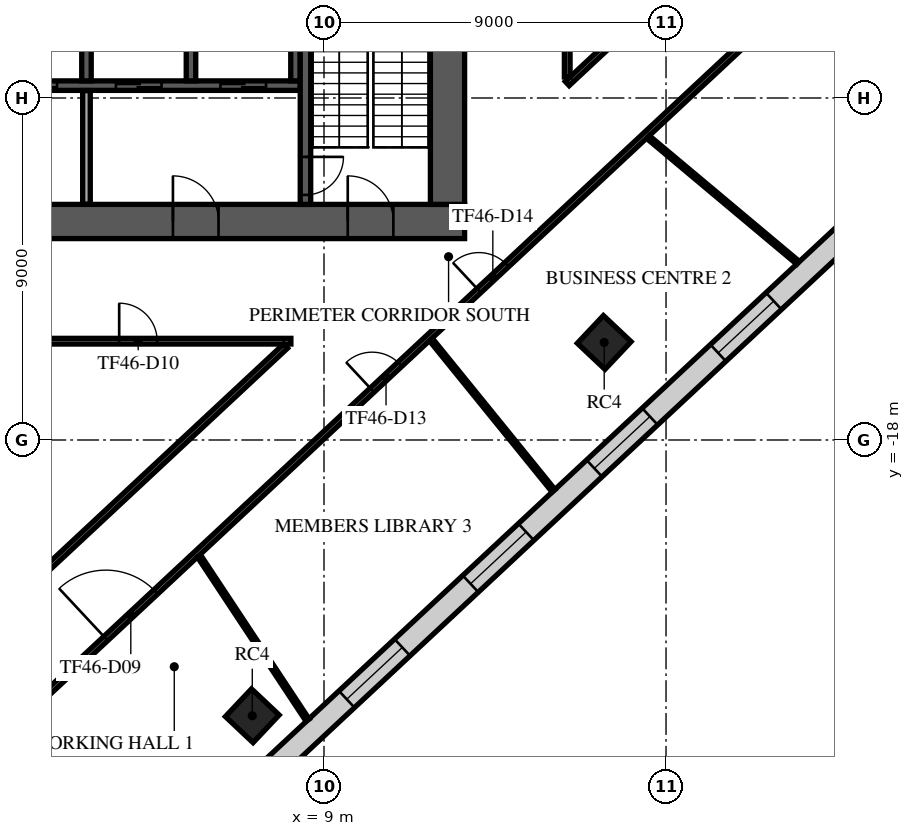
"""IFC4 building model, lengths in metres.
Left out: names, types, materials, properties, quantities, classifications, styles, units other than length and angle.
Written with IfcOpenShell. Run it as: python <this file> out.ifc"""

import sys

from ifc_helpers import new_model, si_unit, direction, frame, frame_2d, origin, origin_2d, place, context, subcontext, project, spatial, rectangle, extrude, element, fill, save


model = new_model("IFC4")
c1 = context("Model", 3, precision=1e-05, world=origin(), true_north=direction((0.0, 1.0)))
c2 = subcontext(c1, "Body", "Model", "MODEL_VIEW")
j1 = project(units=[si_unit("LENGTHUNIT", "METRE"), si_unit("PLANEANGLEUNIT", "RADIAN")], contexts=[c1])
p1 = place(None, origin())
s1 = spatial("IfcSite", under=j1, at=p1, CompositionType="ELEMENT")
p2 = place(p1, origin())
s2 = spatial("IfcBuilding", under=s1, at=p2, CompositionType="ELEMENT")
p3 = place(p2, frame((0.0, 0.0, 197.3)))
s3 = spatial("IfcBuildingStorey", under=s2, at=p3, CompositionType="ELEMENT", Elevation=197.3)
for number, where, z_axis, x_axis in (
    (1, (7.113, -25.257, 0.0), (0.0, 0.0, 1.0), (0.686, 0.728, 0.0)),
    (2, (16.373, -15.433, 0.0), (0.0, 0.0, 1.0), (0.686, 0.728, 0.0)),
):
    element("IfcColumn", number, at=place(p3, frame(where, z_axis=z_axis, x_axis=x_axis)), inside=s3, PredefinedType="COLUMN", context=c2, shape_type="SweptSolid", body=[
        extrude(rectangle(XDim=1.0, YDim=1.0, at=origin_2d()), origin(), (0.0, 0.0, 1.0), 4.0),
    ])
p4 = place(p3, frame((-12.7, -12.25, 0.0), z_axis=(0.0, 0.0, 1.0), x_axis=(1.0, 0.0, 0.0)))
e3 = element("IfcWall", 3, at=p4, inside=s3, PredefinedType="SHEAR", context=c2, shape_type="SweptSolid", body=[
    extrude(rectangle(XDim=25.4, YDim=0.9, at=frame_2d((12.7, 0.0))), origin(), (0.0, 0.0, 1.0), 3.62),
])
p5 = place(p4, frame((7.6, 0.0, 0.0)))
e4 = element("IfcOpeningElement", 4, at=p5, cuts=e3, PredefinedType="OPENING", context=c2, shape_type="SweptSolid", body=[
    extrude(rectangle(XDim=2.0, YDim=2.1, at=frame_2d((1.0, 1.05))), frame((0.0, 0.46, 0.0), z_axis=(0.0, -1.0, 0.0), x_axis=(1.0, 0.0, 0.0)), (0.0, 0.0, 1.0), 0.92),
])
p6 = place(p4, frame((17.725, 0.0, 0.0)))
e5 = element("IfcOpeningElement", 5, at=p6, cuts=e3, PredefinedType="OPENING", context=c2, shape_type="SweptSolid", body=[
    extrude(rectangle(XDim=1.2, YDim=2.1, at=frame_2d((0.6, 1.05))), frame((0.0, 0.46, 0.0), z_axis=(0.0, -1.0, 0.0), x_axis=(1.0, 0.0, 0.0)), (0.0, 0.0, 1.0), 0.92),
])
p7 = place(p4, frame((1.875, 0.0, 0.0)))
e6 = element("IfcOpeningElement", 6, at=p7, cuts=e3, PredefinedType="OPENING", context=c2, shape_type="SweptSolid", body=[
    extrude(rectangle(XDim=1.2, YDim=2.1, at=frame_2d((0.6, 1.05))), frame((0.0, 0.46, 0.0), z_axis=(0.0, -1.0, 0.0), x_axis=(1.0, 0.0, 0.0)), (0.0, 0.0, 1.0), 0.92),
])
p8 = place(p4, frame((22.325, 0.0, 0.0)))
e7 = element("IfcOpeningElement", 7, at=p8, cuts=e3, PredefinedType="OPENING", context=c2, shape_type="SweptSolid", body=[
    extrude(rectangle(XDim=1.2, YDim=2.1, at=frame_2d((0.6, 1.05))), frame((0.0, 0.46, 0.0), z_axis=(0.0, -1.0, 0.0), x_axis=(1.0, 0.0, 0.0)), (0.0, 0.0, 1.0), 0.92),
])
p9 = place(p3, frame((12.25, -11.8, 0.0), z_axis=(0.0, 0.0, 1.0), x_axis=(0.0, 1.0, 0.0)))
e8 = element("IfcWall", 8, at=p9, inside=s3, PredefinedType="SHEAR", context=c2, shape_type="SweptSolid", body=[
    extrude(rectangle(XDim=23.6, YDim=0.9, at=frame_2d((11.8, 0.0))), origin(), (0.0, 0.0, 1.0), 3.62),
])
p10 = place(p9, frame((10.6, 0.0, 0.0)))
e9 = element("IfcOpeningElement", 9, at=p10, cuts=e8, PredefinedType="OPENING", context=c2, shape_type="SweptSolid", body=[
    extrude(rectangle(XDim=2.4, YDim=2.4, at=frame_2d((1.2, 1.2))), frame((0.0, 0.46, 0.0), z_axis=(0.0, -1.0, 0.0), x_axis=(1.0, 0.0, 0.0)), (0.0, 0.0, 1.0), 0.92),
])
p11 = place(p3, frame((-2.875, -8.675, 0.0), z_axis=(0.0, 0.0, 1.0), x_axis=(1.0, 0.0, 0.0)))
e10 = element("IfcWall", 10, at=p11, inside=s3, PredefinedType="SOLIDWALL", context=c2, shape_type="SweptSolid", body=[
    extrude(rectangle(XDim=11.25, YDim=0.25, at=frame_2d((5.625, 0.0))), origin(), (0.0, 0.0, 1.0), 3.62),
])
p12 = place(p11, frame((0.9, 0.0, 0.0)))
e11 = element("IfcOpeningElement", 11, at=p12, cuts=e10, PredefinedType="OPENING", context=c2, shape_type="SweptSolid", body=[
    extrude(rectangle(XDim=1.2, YDim=2.1, at=frame_2d((0.6, 1.05))), frame((0.0, 0.135, 0.0), z_axis=(0.0, -1.0, 0.0), x_axis=(1.0, 0.0, 0.0)), (0.0, 0.0, 1.0), 0.27),
])
p13 = place(p11, frame((3.65, 0.0, 0.0)))
e12 = element("IfcOpeningElement", 12, at=p13, cuts=e10, PredefinedType="OPENING", context=c2, shape_type="SweptSolid", body=[
    extrude(rectangle(XDim=1.2, YDim=2.1, at=frame_2d((0.6, 1.05))), frame((0.0, 0.135, 0.0), z_axis=(0.0, -1.0, 0.0), x_axis=(1.0, 0.0, 0.0)), (0.0, 0.0, 1.0), 0.27),
])
p14 = place(p11, frame((6.4, 0.0, 0.0)))
e13 = element("IfcOpeningElement", 13, at=p14, cuts=e10, PredefinedType="OPENING", context=c2, shape_type="SweptSolid", body=[
    extrude(rectangle(XDim=1.2, YDim=2.1, at=frame_2d((0.6, 1.05))), frame((0.0, 0.135, 0.0), z_axis=(0.0, -1.0, 0.0), x_axis=(1.0, 0.0, 0.0)), (0.0, 0.0, 1.0), 0.27),
])
p15 = place(p11, frame((9.15, 0.0, 0.0)))
e14 = element("IfcOpeningElement", 14, at=p15, cuts=e10, PredefinedType="OPENING", context=c2, shape_type="SweptSolid", body=[
    extrude(rectangle(XDim=1.2, YDim=2.1, at=frame_2d((0.6, 1.05))), frame((0.0, 0.135, 0.0), z_axis=(0.0, -1.0, 0.0), x_axis=(1.0, 0.0, 0.0)), (0.0, 0.0, 1.0), 0.27),
])
for number, where, z_axis, x_axis in (
    (15, (2.75, -8.55, 0.0), (0.0, 0.0, 1.0), (0.0, 1.0, 0.0)),
    (16, (5.5, -8.55, 0.0), (0.0, 0.0, 1.0), (0.0, 1.0, 0.0)),
    (17, (8.25, -8.55, 0.0), (0.0, 0.0, 1.0), (0.0, 1.0, 0.0)),
):
    element("IfcWall", number, at=place(p3, frame(where, z_axis=z_axis, x_axis=x_axis)), inside=s3, PredefinedType="SOLIDWALL", context=c2, shape_type="SweptSolid", body=[
        extrude(rectangle(XDim=2.7, YDim=0.25, at=frame_2d((1.35, 0.0))), origin(), (0.0, 0.0, 1.0), 3.62),
    ])
p16 = place(p3, frame((8.512, -4.55, 0.0), z_axis=(0.0, 0.0, 1.0), x_axis=(0.0, -1.0, 0.0)))
e18 = element("IfcWall", 18, at=p16, inside=s3, PredefinedType="SOLIDWALL", context=c2, shape_type="SweptSolid", body=[
    extrude(rectangle(XDim=7.25, YDim=0.275, at=frame_2d((3.625, 0.0))), origin(), (0.0, 0.0, 1.0), 3.62),
])
p17 = place(p16, frame((6.0, 0.0, 0.0)))
e19 = element("IfcOpeningElement", 19, at=p17, cuts=e18, PredefinedType="OPENING", context=c2, shape_type="SweptSolid", body=[
    extrude(rectangle(XDim=1.0, YDim=2.1, at=frame_2d((0.5, 1.05))), frame((0.0, 0.147, 0.0), z_axis=(0.0, -1.0, 0.0), x_axis=(1.0, 0.0, 0.0)), (0.0, 0.0, 1.0), 0.295),
])
p18 = place(p3, frame((2.75, -11.795, 0.0), z_axis=(0.0, 0.0, 1.0), x_axis=(0.0, 1.0, 0.0)))
e20 = element("IfcWall", 20, at=p18, inside=s3, PredefinedType="PARTITIONING", context=c2, shape_type="SweptSolid", body=[
    extrude(rectangle(XDim=2.99, YDim=0.2, at=frame_2d((1.495, 0.0))), origin(), (0.0, 0.0, 1.0), 3.62),
])
p19 = place(p3, frame((-1.073, -34.773, 0.0), z_axis=(0.0, 0.0, 1.0), x_axis=(0.731351780381, 0.682000420333, 0.0)))
e21 = element("IfcWall", 21, at=p19, inside=s3, PredefinedType="STANDARD", context=c2, shape_type="SweptSolid", body=[
    extrude(rectangle(XDim=49.0, YDim=0.6, at=frame_2d((24.5, 0.0))), origin(), (0.0, 0.0, 1.0), 3.62),
])
p20 = place(p19, frame((1.227, 0.0, 0.9)))
e22 = element("IfcOpeningElement", 22, at=p20, cuts=e21, PredefinedType="OPENING", context=c2, shape_type="SweptSolid", body=[
    extrude(rectangle(XDim=2.0, YDim=2.1, at=frame_2d((1.0, 1.05))), frame((0.0, 0.31, 0.0), z_axis=(0.0, -1.0, 0.0), x_axis=(1.0, 0.0, 0.0)), (0.0, 0.0, 1.0), 0.62),
])
p21 = place(p19, frame((5.682, 0.0, 0.9)))
e23 = element("IfcOpeningElement", 23, at=p21, cuts=e21, PredefinedType="OPENING", context=c2, shape_type="SweptSolid", body=[
    extrude(rectangle(XDim=2.0, YDim=2.1, at=frame_2d((1.0, 1.05))), frame((0.0, 0.31, 0.0), z_axis=(0.0, -1.0, 0.0), x_axis=(1.0, 0.0, 0.0)), (0.0, 0.0, 1.0), 0.62),
])
p22 = place(p19, frame((14.591, 0.0, 0.9)))
e24 = element("IfcOpeningElement", 24, at=p22, cuts=e21, PredefinedType="OPENING", context=c2, shape_type="SweptSolid", body=[
    extrude(rectangle(XDim=2.0, YDim=2.1, at=frame_2d((1.0, 1.05))), frame((0.0, 0.31, 0.0), z_axis=(0.0, -1.0, 0.0), x_axis=(1.0, 0.0, 0.0)), (0.0, 0.0, 1.0), 0.62),
])
p23 = place(p19, frame((19.045, 0.0, 0.9)))
e25 = element("IfcOpeningElement", 25, at=p23, cuts=e21, PredefinedType="OPENING", context=c2, shape_type="SweptSolid", body=[
    extrude(rectangle(XDim=2.0, YDim=2.1, at=frame_2d((1.0, 1.05))), frame((0.0, 0.31, 0.0), z_axis=(0.0, -1.0, 0.0), x_axis=(1.0, 0.0, 0.0)), (0.0, 0.0, 1.0), 0.62),
])
p24 = place(p19, frame((23.5, 0.0, 0.9)))
e26 = element("IfcOpeningElement", 26, at=p24, cuts=e21, PredefinedType="OPENING", context=c2, shape_type="SweptSolid", body=[
    extrude(rectangle(XDim=2.0, YDim=2.1, at=frame_2d((1.0, 1.05))), frame((0.0, 0.31, 0.0), z_axis=(0.0, -1.0, 0.0), x_axis=(1.0, 0.0, 0.0)), (0.0, 0.0, 1.0), 0.62),
])
p25 = place(p19, frame((27.955, 0.0, 0.9)))
e27 = element("IfcOpeningElement", 27, at=p25, cuts=e21, PredefinedType="OPENING", context=c2, shape_type="SweptSolid", body=[
    extrude(rectangle(XDim=2.0, YDim=2.1, at=frame_2d((1.0, 1.05))), frame((0.0, 0.31, 0.0), z_axis=(0.0, -1.0, 0.0), x_axis=(1.0, 0.0, 0.0)), (0.0, 0.0, 1.0), 0.62),
])
p26 = place(p19, frame((32.409, 0.0, 0.9)))
e28 = element("IfcOpeningElement", 28, at=p26, cuts=e21, PredefinedType="OPENING", context=c2, shape_type="SweptSolid", body=[
    extrude(rectangle(XDim=2.0, YDim=2.1, at=frame_2d((1.0, 1.05))), frame((0.0, 0.31, 0.0), z_axis=(0.0, -1.0, 0.0), x_axis=(1.0, 0.0, 0.0)), (0.0, 0.0, 1.0), 0.62),
])
p27 = place(p19, frame((36.864, 0.0, 0.9)))
e29 = element("IfcOpeningElement", 29, at=p27, cuts=e21, PredefinedType="OPENING", context=c2, shape_type="SweptSolid", body=[
    extrude(rectangle(XDim=2.0, YDim=2.1, at=frame_2d((1.0, 1.05))), frame((0.0, 0.31, 0.0), z_axis=(0.0, -1.0, 0.0), x_axis=(1.0, 0.0, 0.0)), (0.0, 0.0, 1.0), 0.62),
])
p28 = place(p19, frame((41.318, 0.0, 0.9)))
e30 = element("IfcOpeningElement", 30, at=p28, cuts=e21, PredefinedType="OPENING", context=c2, shape_type="SweptSolid", body=[
    extrude(rectangle(XDim=2.0, YDim=2.1, at=frame_2d((1.0, 1.05))), frame((0.0, 0.31, 0.0), z_axis=(0.0, -1.0, 0.0), x_axis=(1.0, 0.0, 0.0)), (0.0, 0.0, 1.0), 0.62),
])
p29 = place(p19, frame((45.773, 0.0, 0.9)))
e31 = element("IfcOpeningElement", 31, at=p29, cuts=e21, PredefinedType="OPENING", context=c2, shape_type="SweptSolid", body=[
    extrude(rectangle(XDim=2.0, YDim=2.1, at=frame_2d((1.0, 1.05))), frame((0.0, 0.31, 0.0), z_axis=(0.0, -1.0, 0.0), x_axis=(1.0, 0.0, 0.0)), (0.0, 0.0, 1.0), 0.62),
])
p30 = place(p3, frame((-12.208, -15.4, 0.0), z_axis=(0.0, 0.0, 1.0), x_axis=(1.0, 0.0, 0.0)))
e32 = element("IfcWall", 32, at=p30, inside=s3, PredefinedType="PARTITIONING", context=c2, shape_type="SweptSolid", body=[
    extrude(rectangle(XDim=20.336, YDim=0.15, at=frame_2d((10.168, 0.0))), origin(), (0.0, 0.0, 1.0), 3.17),
])
p31 = place(p30, frame((1.05, 0.0, 0.0)))
e33 = element("IfcOpeningElement", 33, at=p31, cuts=e32, PredefinedType="OPENING", context=c2, shape_type="SweptSolid", body=[
    extrude(rectangle(XDim=1.0, YDim=2.1, at=frame_2d((0.5, 1.05))), frame((0.0, 0.085, 0.0), z_axis=(0.0, -1.0, 0.0), x_axis=(1.0, 0.0, 0.0)), (0.0, 0.0, 1.0), 0.17),
])
p32 = place(p30, frame((15.818, 0.0, 0.0)))
e34 = element("IfcOpeningElement", 34, at=p32, cuts=e32, PredefinedType="OPENING", context=c2, shape_type="SweptSolid", body=[
    extrude(rectangle(XDim=1.0, YDim=2.1, at=frame_2d((0.5, 1.05))), frame((0.0, 0.085, 0.0), z_axis=(0.0, -1.0, 0.0), x_axis=(1.0, 0.0, 0.0)), (0.0, 0.0, 1.0), 0.17),
])
p33 = place(p3, frame((-0.061, -23.038, 0.0), z_axis=(0.0, 0.0, 1.0), x_axis=(0.731316284431, 0.682038482878, 0.0)))
e35 = element("IfcWall", 35, at=p33, inside=s3, PredefinedType="PARTITIONING", context=c2, shape_type="SweptSolid", body=[
    extrude(rectangle(XDim=11.009, YDim=0.15, at=frame_2d((5.504, 0.0))), origin(), (0.0, 0.0, 1.0), 3.17),
])
p34 = place(p3, frame((1.576, -24.793, 0.0), z_axis=(0.0, 0.0, 1.0), x_axis=(0.731351215564, 0.68200102602, 0.0)))
e36 = element("IfcWall", 36, at=p34, inside=s3, PredefinedType="PARTITIONING", context=c2, shape_type="SweptSolid", body=[
    extrude(rectangle(XDim=31.513, YDim=0.15, at=frame_2d((15.757, 0.0))), origin(), (0.0, 0.0, 1.0), 3.17),
])
p35 = place(p34, frame((2.3, 0.0, 0.0)))
e37 = element("IfcOpeningElement", 37, at=p35, cuts=e36, PredefinedType="OPENING", context=c2, shape_type="SweptSolid", body=[
    extrude(rectangle(XDim=1.8, YDim=2.1, at=frame_2d((0.9, 1.05))), frame((0.0, 0.085, 0.0), z_axis=(0.0, -1.0, 0.0), x_axis=(1.0, 0.0, 0.0)), (0.0, 0.0, 1.0), 0.17),
])
p36 = place(p34, frame((11.883, 0.0, 0.0)))
e38 = element("IfcOpeningElement", 38, at=p36, cuts=e36, PredefinedType="OPENING", context=c2, shape_type="SweptSolid", body=[
    extrude(rectangle(XDim=1.0, YDim=2.1, at=frame_2d((0.5, 1.05))), frame((0.0, 0.085, 0.0), z_axis=(0.0, -1.0, 0.0), x_axis=(1.0, 0.0, 0.0)), (0.0, 0.0, 1.0), 0.17),
])
p37 = place(p34, frame((15.726, 0.0, 0.0)))
e39 = element("IfcOpeningElement", 39, at=p37, cuts=e36, PredefinedType="OPENING", context=c2, shape_type="SweptSolid", body=[
    extrude(rectangle(XDim=1.0, YDim=2.1, at=frame_2d((0.5, 1.05))), frame((0.0, 0.085, 0.0), z_axis=(0.0, -1.0, 0.0), x_axis=(1.0, 0.0, 0.0)), (0.0, 0.0, 1.0), 0.17),
])
p38 = place(p3, frame((15.4, -8.62, 0.0), z_axis=(0.0, 0.0, 1.0), x_axis=(0.731354186133, 0.681997840485, 0.0)))
e40 = element("IfcWall", 40, at=p38, inside=s3, PredefinedType="PARTITIONING", context=c2, shape_type="SweptSolid", body=[
    extrude(rectangle(XDim=10.373, YDim=0.15, at=frame_2d((5.187, 0.0))), origin(), (0.0, 0.0, 1.0), 3.17),
])
p39 = place(p3, frame((15.4, -8.448, 0.0), z_axis=(0.0, 0.0, 1.0), x_axis=(0.0, 1.0, 0.0)))
e41 = element("IfcWall", 41, at=p39, inside=s3, PredefinedType="PARTITIONING", context=c2, shape_type="SweptSolid", body=[
    extrude(rectangle(XDim=20.608, YDim=0.15, at=frame_2d((10.304, 0.0))), origin(), (0.0, 0.0, 1.0), 3.17),
])
p40 = place(p39, frame((3.3, 0.0, 0.0)))
e42 = element("IfcOpeningElement", 42, at=p40, cuts=e41, PredefinedType="OPENING", context=c2, shape_type="SweptSolid", body=[
    extrude(rectangle(XDim=1.0, YDim=2.1, at=frame_2d((0.5, 1.05))), frame((0.0, 0.085, 0.0), z_axis=(0.0, -1.0, 0.0), x_axis=(1.0, 0.0, 0.0)), (0.0, 0.0, 1.0), 0.17),
])
p41 = place(p39, frame((11.298, 0.0, 0.0)))
e43 = element("IfcOpeningElement", 43, at=p41, cuts=e41, PredefinedType="OPENING", context=c2, shape_type="SweptSolid", body=[
    extrude(rectangle(XDim=1.8, YDim=2.1, at=frame_2d((0.9, 1.05))), frame((0.0, 0.085, 0.0), z_axis=(0.0, -1.0, 0.0), x_axis=(1.0, 0.0, 0.0)), (0.0, 0.0, 1.0), 0.17),
])
p42 = place(p3, frame((5.711, -21.052, 0.0), z_axis=(0.0, 0.0, 1.0), x_axis=(0.55163930412, -0.834082776557, 0.0)))
e44 = element("IfcWall", 44, at=p42, inside=s3, PredefinedType="PARTITIONING", context=c2, shape_type="SweptSolid", body=[
    extrude(rectangle(XDim=5.178, YDim=0.1, at=frame_2d((2.589, 0.0))), origin(), (0.0, 0.0, 1.0), 2.97),
])
p43 = place(p3, frame((11.812, -15.355, 0.0), z_axis=(0.0, 0.0, 1.0), x_axis=(0.629927020313, -0.776654330497, 0.0)))
e45 = element("IfcWall", 45, at=p43, inside=s3, PredefinedType="PARTITIONING", context=c2, shape_type="SweptSolid", body=[
    extrude(rectangle(XDim=5.125, YDim=0.1, at=frame_2d((2.562, 0.0))), origin(), (0.0, 0.0, 1.0), 2.97),
])
p44 = place(p3, frame((17.527, -10.03, 0.0), z_axis=(0.0, 0.0, 1.0), x_axis=(0.76649272058, -0.642252994775, 0.0)))
e46 = element("IfcWall", 46, at=p44, inside=s3, PredefinedType="PARTITIONING", context=c2, shape_type="SweptSolid", body=[
    extrude(rectangle(XDim=5.148, YDim=0.1, at=frame_2d((2.574, 0.0))), origin(), (0.0, 0.0, 1.0), 2.97),
])
p45 = place(p6, origin())
e47 = element("IfcDoor", 47, at=p45, inside=s3, OperationType="SINGLE_SWING_LEFT", PredefinedType="DOOR", context=c2, shape_type="SweptSolid", body=[
    extrude(rectangle(XDim=1.2, YDim=2.1, at=frame_2d((0.6, 1.05))), frame((0.0, 0.025, 0.0), z_axis=(0.0, -1.0, 0.0), x_axis=(1.0, 0.0, 0.0)), (0.0, 0.0, 1.0), 0.05),
])
fill(e5, e47)
p46 = place(p8, origin())
e48 = element("IfcDoor", 48, at=p46, inside=s3, OperationType="SINGLE_SWING_LEFT", PredefinedType="DOOR", context=c2, shape_type="SweptSolid", body=[
    extrude(rectangle(XDim=1.2, YDim=2.1, at=frame_2d((0.6, 1.05))), frame((0.0, 0.025, 0.0), z_axis=(0.0, -1.0, 0.0), x_axis=(1.0, 0.0, 0.0)), (0.0, 0.0, 1.0), 0.05),
])
fill(e7, e48)
p47 = place(p13, origin())
e49 = element("IfcDoor", 49, at=p47, inside=s3, OperationType="DOUBLE_DOOR_SLIDING", PredefinedType="DOOR", context=c2, shape_type="SweptSolid", body=[
    extrude(rectangle(XDim=1.2, YDim=2.1, at=frame_2d((0.6, 1.05))), frame((0.0, 0.025, 0.0), z_axis=(0.0, -1.0, 0.0), x_axis=(1.0, 0.0, 0.0)), (0.0, 0.0, 1.0), 0.05),
])
fill(e12, e49)
p48 = place(p14, origin())
e50 = element("IfcDoor", 50, at=p48, inside=s3, OperationType="DOUBLE_DOOR_SLIDING", PredefinedType="DOOR", context=c2, shape_type="SweptSolid", body=[
    extrude(rectangle(XDim=1.2, YDim=2.1, at=frame_2d((0.6, 1.05))), frame((0.0, 0.025, 0.0), z_axis=(0.0, -1.0, 0.0), x_axis=(1.0, 0.0, 0.0)), (0.0, 0.0, 1.0), 0.05),
])
fill(e13, e50)
p49 = place(p15, origin())
e51 = element("IfcDoor", 51, at=p49, inside=s3, OperationType="DOUBLE_DOOR_SLIDING", PredefinedType="DOOR", context=c2, shape_type="SweptSolid", body=[
    extrude(rectangle(XDim=1.2, YDim=2.1, at=frame_2d((0.6, 1.05))), frame((0.0, 0.025, 0.0), z_axis=(0.0, -1.0, 0.0), x_axis=(1.0, 0.0, 0.0)), (0.0, 0.0, 1.0), 0.05),
])
fill(e14, e51)
p50 = place(p17, origin())
e52 = element("IfcDoor", 52, at=p50, inside=s3, OperationType="SINGLE_SWING_LEFT", PredefinedType="DOOR", context=c2, shape_type="SweptSolid", body=[
    extrude(rectangle(XDim=1.0, YDim=2.1, at=frame_2d((0.5, 1.05))), frame((0.0, 0.025, 0.0), z_axis=(0.0, -1.0, 0.0), x_axis=(1.0, 0.0, 0.0)), (0.0, 0.0, 1.0), 0.05),
])
fill(e19, e52)
p51 = place(p22, origin())
e53 = element("IfcWindow", 53, at=p51, inside=s3, PartitioningType="SINGLE_PANEL", PredefinedType="WINDOW", context=c2, shape_type="SweptSolid", body=[
    extrude(rectangle(XDim=2.0, YDim=2.1, at=frame_2d((1.0, 1.05))), frame((0.0, 0.03, 0.0), z_axis=(0.0, -1.0, 0.0), x_axis=(1.0, 0.0, 0.0)), (0.0, 0.0, 1.0), 0.06),
])
fill(e24, e53)
p52 = place(p23, origin())
e54 = element("IfcWindow", 54, at=p52, inside=s3, PartitioningType="SINGLE_PANEL", PredefinedType="WINDOW", context=c2, shape_type="SweptSolid", body=[
    extrude(rectangle(XDim=2.0, YDim=2.1, at=frame_2d((1.0, 1.05))), frame((0.0, 0.03, 0.0), z_axis=(0.0, -1.0, 0.0), x_axis=(1.0, 0.0, 0.0)), (0.0, 0.0, 1.0), 0.06),
])
fill(e25, e54)
p53 = place(p24, origin())
e55 = element("IfcWindow", 55, at=p53, inside=s3, PartitioningType="SINGLE_PANEL", PredefinedType="WINDOW", context=c2, shape_type="SweptSolid", body=[
    extrude(rectangle(XDim=2.0, YDim=2.1, at=frame_2d((1.0, 1.05))), frame((0.0, 0.03, 0.0), z_axis=(0.0, -1.0, 0.0), x_axis=(1.0, 0.0, 0.0)), (0.0, 0.0, 1.0), 0.06),
])
fill(e26, e55)
p54 = place(p25, origin())
e56 = element("IfcWindow", 56, at=p54, inside=s3, PartitioningType="SINGLE_PANEL", PredefinedType="WINDOW", context=c2, shape_type="SweptSolid", body=[
    extrude(rectangle(XDim=2.0, YDim=2.1, at=frame_2d((1.0, 1.05))), frame((0.0, 0.03, 0.0), z_axis=(0.0, -1.0, 0.0), x_axis=(1.0, 0.0, 0.0)), (0.0, 0.0, 1.0), 0.06),
])
fill(e27, e56)
p55 = place(p35, frame((1.8, 0.0, 0.0), z_axis=(0.0, 0.0, 1.0), x_axis=(-1.0, 0.0, 0.0)))
e57 = element("IfcDoor", 57, at=p55, inside=s3, OperationType="DOUBLE_DOOR_SINGLE_SWING", PredefinedType="DOOR", context=c2, shape_type="SweptSolid", body=[
    extrude(rectangle(XDim=1.8, YDim=2.1, at=frame_2d((0.9, 1.05))), frame((0.0, 0.025, 0.0), z_axis=(0.0, -1.0, 0.0), x_axis=(1.0, 0.0, 0.0)), (0.0, 0.0, 1.0), 0.05),
])
fill(e37, e57)
p56 = place(p32, frame((1.0, 0.0, 0.0), z_axis=(0.0, 0.0, 1.0), x_axis=(-1.0, 0.0, 0.0)))
e58 = element("IfcDoor", 58, at=p56, inside=s3, OperationType="SINGLE_SWING_LEFT", PredefinedType="DOOR", context=c2, shape_type="SweptSolid", body=[
    extrude(rectangle(XDim=1.0, YDim=2.1, at=frame_2d((0.5, 1.05))), frame((0.0, 0.025, 0.0), z_axis=(0.0, -1.0, 0.0), x_axis=(1.0, 0.0, 0.0)), (0.0, 0.0, 1.0), 0.05),
])
fill(e34, e58)
p57 = place(p36, frame((1.0, 0.0, 0.0), z_axis=(0.0, 0.0, 1.0), x_axis=(-1.0, 0.0, 0.0)))
e59 = element("IfcDoor", 59, at=p57, inside=s3, OperationType="SINGLE_SWING_LEFT", PredefinedType="DOOR", context=c2, shape_type="SweptSolid", body=[
    extrude(rectangle(XDim=1.0, YDim=2.1, at=frame_2d((0.5, 1.05))), frame((0.0, 0.025, 0.0), z_axis=(0.0, -1.0, 0.0), x_axis=(1.0, 0.0, 0.0)), (0.0, 0.0, 1.0), 0.05),
])
fill(e38, e59)
p58 = place(p37, frame((1.0, 0.0, 0.0), z_axis=(0.0, 0.0, 1.0), x_axis=(-1.0, 0.0, 0.0)))
e60 = element("IfcDoor", 60, at=p58, inside=s3, OperationType="SINGLE_SWING_LEFT", PredefinedType="DOOR", context=c2, shape_type="SweptSolid", body=[
    extrude(rectangle(XDim=1.0, YDim=2.1, at=frame_2d((0.5, 1.05))), frame((0.0, 0.025, 0.0), z_axis=(0.0, -1.0, 0.0), x_axis=(1.0, 0.0, 0.0)), (0.0, 0.0, 1.0), 0.05),
])
fill(e39, e60)
save(model, sys.argv[1])
